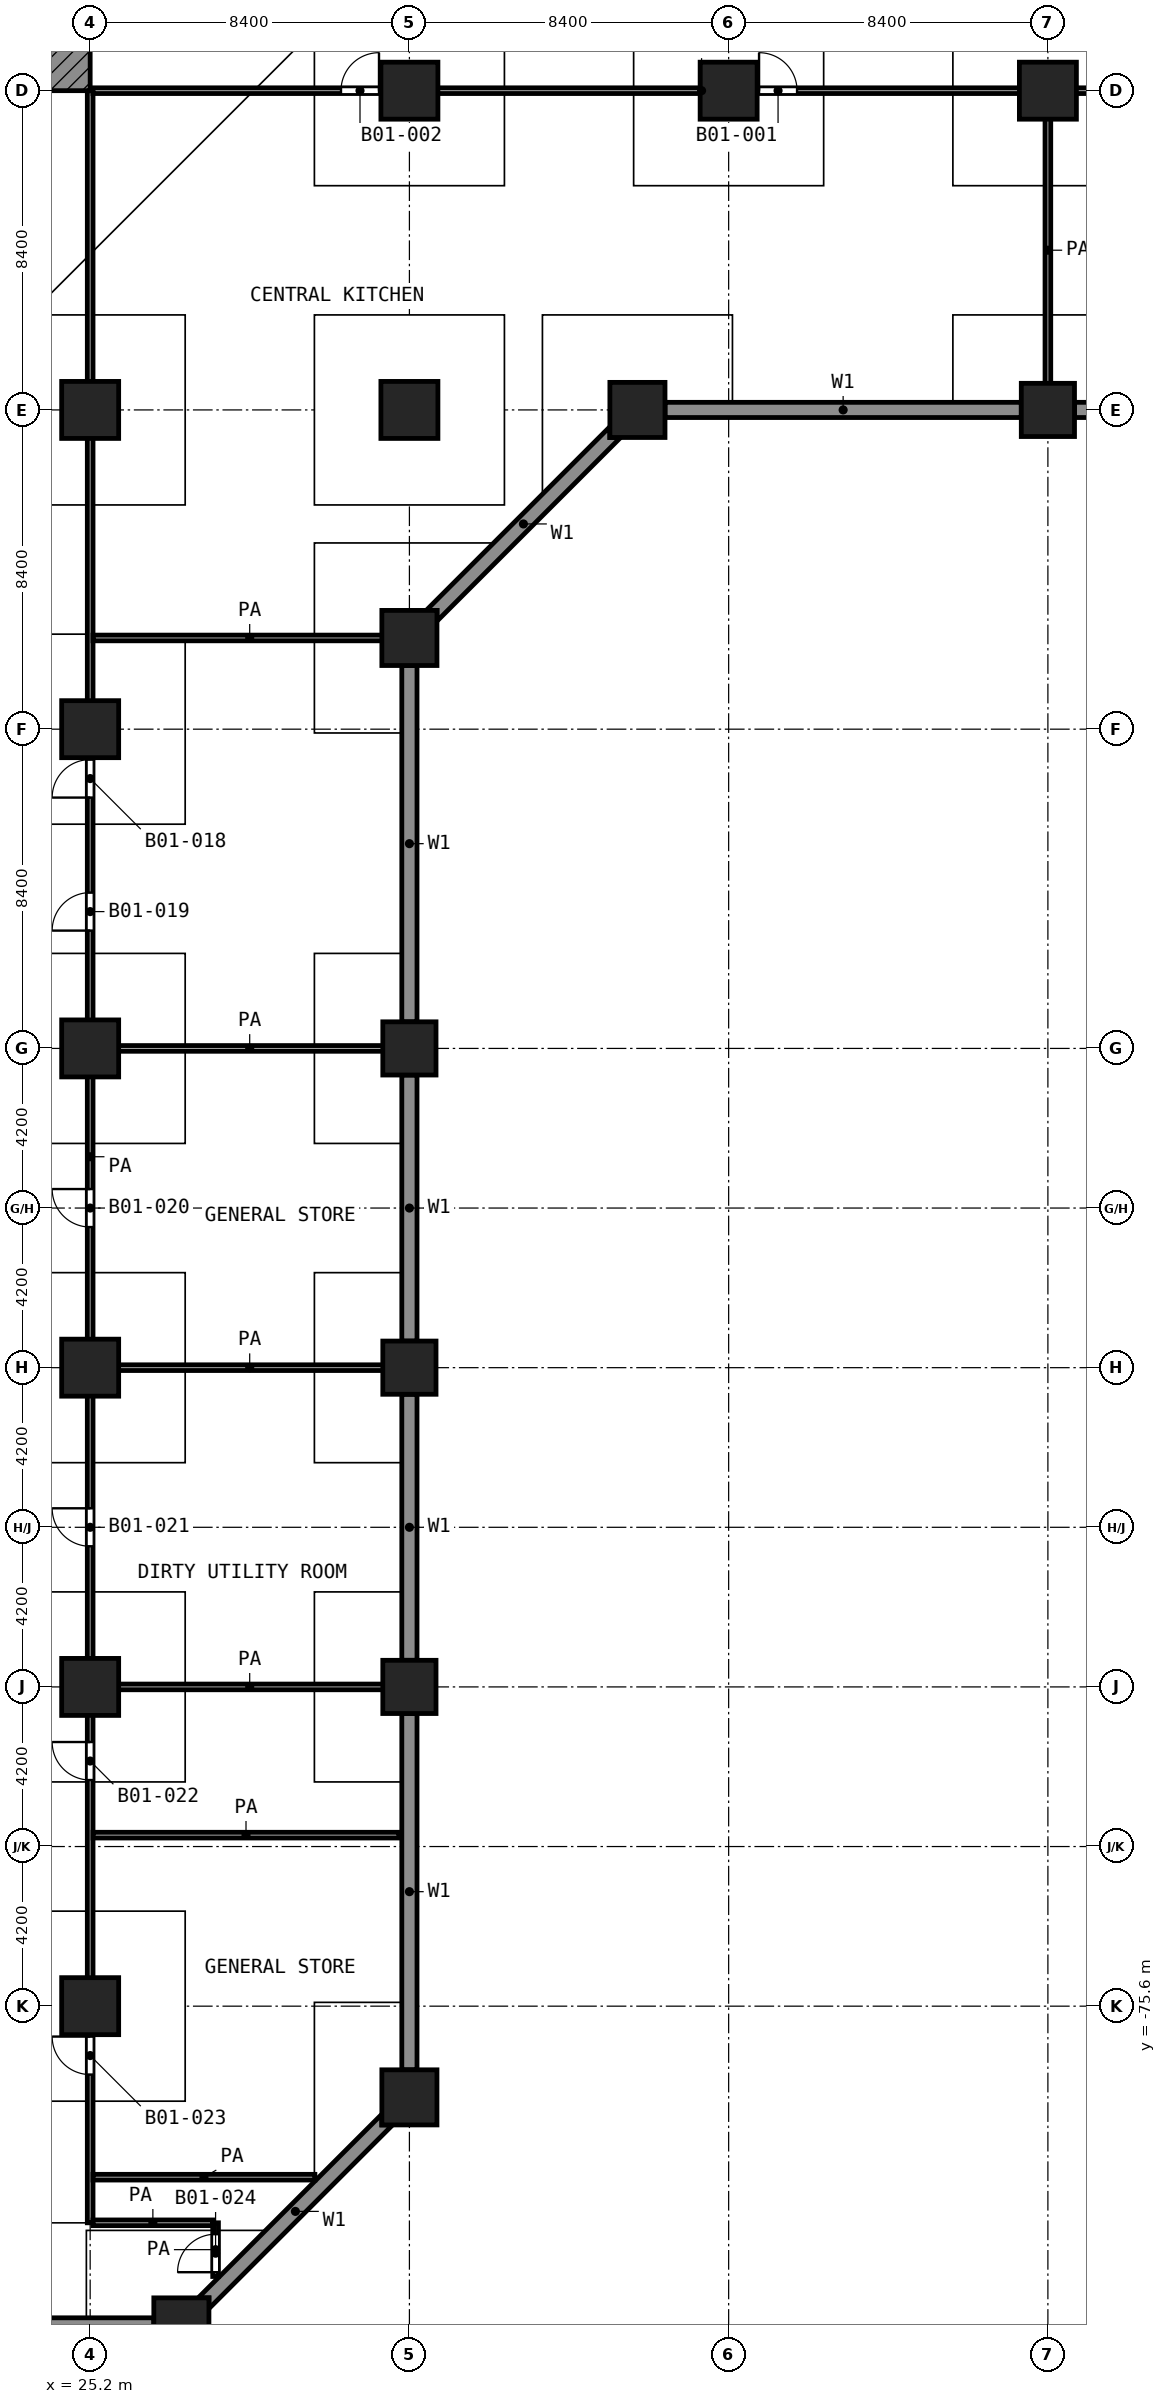
"""IFC4 building model, lengths in metres.
Left out: names, types, materials, properties, quantities, classifications, styles, units other than length and angle.
Written with IfcOpenShell. Run it as: python <this file> out.ifc"""

import sys

from ifc_helpers import new_model, si_unit, direction, frame, frame_2d, origin, origin_2d, place, context, subcontext, project, spatial, polyline, rectangle, outline, extrude, element, fill, save


model = new_model("IFC4")
c1 = context("Model", 3, precision=1e-05, world=origin(), true_north=direction((0.0, 1.0)))
c2 = subcontext(c1, "Body", "Model", "MODEL_VIEW")
j1 = project(units=[si_unit("LENGTHUNIT", "METRE"), si_unit("PLANEANGLEUNIT", "RADIAN")], contexts=[c1])
p1 = place(None, origin())
s1 = spatial("IfcSite", under=j1, at=p1, CompositionType="ELEMENT")
p2 = place(p1, origin())
s2 = spatial("IfcBuilding", under=s1, at=p2, CompositionType="ELEMENT")
p3 = place(p2, frame((0.0, 0.0, -6.0)))
s3 = spatial("IfcBuildingStorey", under=s2, at=p3, CompositionType="ELEMENT", Elevation=-6.0)
p4 = place(p3, origin())
e1 = element("IfcWall", 1, at=p4, inside=s3, PredefinedType="SOLIDWALL", context=c2, shape_type="SweptSolid", body=[
    extrude(outline(polyline([(40.325, -33.4), (49.7, -33.4), (49.7, -33.8), (40.325, -33.8), (40.325, -33.4)])), origin(), (0.0, 0.0, 1.0), 5.55),
])
e2 = element("IfcWall", 2, at=p4, inside=s3, PredefinedType="SOLIDWALL", context=c2, shape_type="SweptSolid", body=[
    extrude(outline(polyline([(51.1, -33.4), (57.6, -33.4), (57.6, -33.8), (51.1, -33.8), (51.1, -33.4)])), origin(), (0.0, 0.0, 1.0), 5.55),
])
e3 = element("IfcWall", 3, at=p4, inside=s3, PredefinedType="SOLIDWALL", context=c2, shape_type="SweptSolid", body=[
    extrude(outline(polyline([(34.325, -38.875), (34.042, -38.875), (38.875, -34.042), (38.875, -34.325), (39.158, -34.325), (34.325, -39.158), (34.325, -38.875)])), origin(), (0.0, 0.0, 1.0), 5.55),
])
e4 = element("IfcWall", 4, at=p4, inside=s3, PredefinedType="SOLIDWALL", context=c2, shape_type="SweptSolid", body=[
    extrude(outline(polyline([(33.4, -49.7), (33.4, -40.325), (33.8, -40.325), (33.8, -49.7), (33.4, -49.7)])), origin(), (0.0, 0.0, 1.0), 5.55),
])
e5 = element("IfcWall", 5, at=p4, inside=s3, PredefinedType="SOLIDWALL", context=c2, shape_type="SweptSolid", body=[
    extrude(outline(polyline([(33.4, -58.1), (33.4, -51.1), (33.8, -51.1), (33.8, -58.1), (33.4, -58.1)])), origin(), (0.0, 0.0, 1.0), 5.55),
])
e6 = element("IfcWall", 6, at=p4, inside=s3, PredefinedType="SOLIDWALL", context=c2, shape_type="SweptSolid", body=[
    extrude(outline(polyline([(33.4, -66.5), (33.4, -59.5), (33.8, -59.5), (33.8, -66.5), (33.4, -66.5)])), origin(), (0.0, 0.0, 1.0), 5.55),
])
e7 = element("IfcWall", 7, at=p4, inside=s3, PredefinedType="SOLIDWALL", context=c2, shape_type="SweptSolid", body=[
    extrude(outline(polyline([(33.4, -77.275), (33.4, -67.9), (33.8, -67.9), (33.8, -77.275), (33.4, -77.275)])), origin(), (0.0, 0.0, 1.0), 5.55),
])
e8 = element("IfcWall", 8, at=p4, inside=s3, PredefinedType="SOLIDWALL", context=c2, shape_type="SweptSolid", body=[
    extrude(outline(polyline([(28.325, -83.275), (28.042, -83.275), (32.875, -78.442), (32.875, -78.725), (33.158, -78.725), (28.325, -83.558), (28.325, -83.275)])), origin(), (0.0, 0.0, 1.0), 5.55),
])
e9 = element("IfcWall", 9, at=p4, inside=s3, PredefinedType="SOLIDWALL", context=c2, shape_type="SweptSolid", body=[
    extrude(outline(polyline([(17.5, -83.8), (26.875, -83.8), (26.875, -84.2), (17.5, -84.2), (17.5, -83.8)])), origin(), (0.0, 0.0, 1.0), 5.55),
])
for number, where, z_axis, x_axis in (
    (10, (33.6, -25.2, 0.0), (0.0, 0.0, 1.0), (1.0, 0.0, 0.0)),
    (11, (42.0, -25.2, 0.0), (0.0, 0.0, 1.0), (1.0, 0.0, 0.0)),
    (12, (50.4, -25.2, 0.0), (0.0, 0.0, 1.0), (1.0, 0.0, 0.0)),
    (13, (25.2, -33.6, 0.0), (0.0, 0.0, 1.0), (1.0, 0.0, 0.0)),
    (14, (33.6, -33.6, 0.0), (0.0, 0.0, 1.0), (1.0, 0.0, 0.0)),
):
    element("IfcColumn", number, at=place(p3, frame(where, z_axis=z_axis, x_axis=x_axis)), inside=s3, PredefinedType="COLUMN", context=c2, shape_type="SweptSolid", body=[
        extrude(rectangle(XDim=1.5, YDim=1.5, at=origin_2d()), origin(), (0.0, 0.0, 1.0), 6.0),
    ])
p5 = place(p3, frame((39.6, -33.6, 0.0), z_axis=(0.0, 0.0, 1.0), x_axis=(1.0, 0.0, 0.0)))
e15 = element("IfcColumn", 15, at=p5, inside=s3, PredefinedType="COLUMN", context=c2, shape_type="SweptSolid", body=[
    extrude(rectangle(XDim=1.45, YDim=1.45, at=origin_2d()), origin(), (0.0, 0.0, 1.0), 6.0),
])
p6 = place(p3, frame((50.4, -33.6, 0.0), z_axis=(0.0, 0.0, 1.0), x_axis=(1.0, 0.0, 0.0)))
e16 = element("IfcColumn", 16, at=p6, inside=s3, PredefinedType="COLUMN", context=c2, shape_type="SweptSolid", body=[
    extrude(rectangle(XDim=1.4, YDim=1.4, at=origin_2d()), origin(), (0.0, 0.0, 1.0), 6.0),
])
p7 = place(p3, frame((33.6, -39.6, 0.0), z_axis=(0.0, 0.0, 1.0), x_axis=(1.0, 0.0, 0.0)))
e17 = element("IfcColumn", 17, at=p7, inside=s3, PredefinedType="COLUMN", context=c2, shape_type="SweptSolid", body=[
    extrude(rectangle(XDim=1.45, YDim=1.45, at=origin_2d()), origin(), (0.0, 0.0, 1.0), 6.0),
])
for number, where, z_axis, x_axis in (
    (18, (25.2, -42.0, 0.0), (0.0, 0.0, 1.0), (1.0, 0.0, 0.0)),
    (19, (25.2, -50.4, 0.0), (0.0, 0.0, 1.0), (1.0, 0.0, 0.0)),
):
    element("IfcColumn", number, at=place(p3, frame(where, z_axis=z_axis, x_axis=x_axis)), inside=s3, PredefinedType="COLUMN", context=c2, shape_type="SweptSolid", body=[
        extrude(rectangle(XDim=1.5, YDim=1.5, at=origin_2d()), origin(), (0.0, 0.0, 1.0), 6.0),
    ])
p8 = place(p3, frame((33.6, -50.4, 0.0), z_axis=(0.0, 0.0, 1.0), x_axis=(1.0, 0.0, 0.0)))
e20 = element("IfcColumn", 20, at=p8, inside=s3, PredefinedType="COLUMN", context=c2, shape_type="SweptSolid", body=[
    extrude(rectangle(XDim=1.4, YDim=1.4, at=origin_2d()), origin(), (0.0, 0.0, 1.0), 6.0),
])
p9 = place(p3, frame((25.2, -58.8, 0.0), z_axis=(0.0, 0.0, 1.0), x_axis=(1.0, 0.0, 0.0)))
e21 = element("IfcColumn", 21, at=p9, inside=s3, PredefinedType="COLUMN", context=c2, shape_type="SweptSolid", body=[
    extrude(rectangle(XDim=1.5, YDim=1.5, at=origin_2d()), origin(), (0.0, 0.0, 1.0), 6.0),
])
p10 = place(p3, frame((33.6, -58.8, 0.0), z_axis=(0.0, 0.0, 1.0), x_axis=(1.0, 0.0, 0.0)))
e22 = element("IfcColumn", 22, at=p10, inside=s3, PredefinedType="COLUMN", context=c2, shape_type="SweptSolid", body=[
    extrude(rectangle(XDim=1.4, YDim=1.4, at=origin_2d()), origin(), (0.0, 0.0, 1.0), 6.0),
])
p11 = place(p3, frame((25.2, -67.2, 0.0), z_axis=(0.0, 0.0, 1.0), x_axis=(1.0, 0.0, 0.0)))
e23 = element("IfcColumn", 23, at=p11, inside=s3, PredefinedType="COLUMN", context=c2, shape_type="SweptSolid", body=[
    extrude(rectangle(XDim=1.5, YDim=1.5, at=origin_2d()), origin(), (0.0, 0.0, 1.0), 6.0),
])
p12 = place(p3, frame((33.6, -67.2, 0.0), z_axis=(0.0, 0.0, 1.0), x_axis=(1.0, 0.0, 0.0)))
e24 = element("IfcColumn", 24, at=p12, inside=s3, PredefinedType="COLUMN", context=c2, shape_type="SweptSolid", body=[
    extrude(rectangle(XDim=1.4, YDim=1.4, at=origin_2d()), origin(), (0.0, 0.0, 1.0), 6.0),
])
p13 = place(p3, frame((25.2, -75.6, 0.0), z_axis=(0.0, 0.0, 1.0), x_axis=(1.0, 0.0, 0.0)))
e25 = element("IfcColumn", 25, at=p13, inside=s3, PredefinedType="COLUMN", context=c2, shape_type="SweptSolid", body=[
    extrude(rectangle(XDim=1.5, YDim=1.5, at=origin_2d()), origin(), (0.0, 0.0, 1.0), 6.0),
])
for number, where, z_axis, x_axis in (
    (26, (33.6, -78.0, 0.0), (0.0, 0.0, 1.0), (1.0, 0.0, 0.0)),
    (27, (27.6, -84.0, 0.0), (0.0, 0.0, 1.0), (1.0, 0.0, 0.0)),
):
    element("IfcColumn", number, at=place(p3, frame(where, z_axis=z_axis, x_axis=x_axis)), inside=s3, PredefinedType="COLUMN", context=c2, shape_type="SweptSolid", body=[
        extrude(rectangle(XDim=1.45, YDim=1.45, at=origin_2d()), origin(), (0.0, 0.0, 1.0), 6.0),
    ])
p14 = place(p3, frame((24.6, -25.2, 0.0), z_axis=(0.0, 0.0, 1.0), x_axis=(0.0, 1.0, 0.0)))
e28 = element("IfcWall", 28, at=p14, inside=s3, PredefinedType="SHEAR", context=c2, shape_type="SweptSolid", body=[
    extrude(rectangle(XDim=1.2, YDim=1.2, at=frame_2d((0.6, 0.0))), origin(), (0.0, 0.0, 1.0), 5.55),
])
p15 = place(p3, frame((25.275, -81.3, 0.0), z_axis=(0.0, 0.0, 1.0), x_axis=(1.0, 0.0, 0.0)))
e29 = element("IfcWall", 29, at=p15, inside=s3, PredefinedType="PARTITIONING", context=c2, shape_type="SweptSolid", body=[
    extrude(rectangle(XDim=3.15, YDim=0.15, at=frame_2d((1.575, 0.0))), origin(), (0.0, 0.0, 1.0), 5.55),
])
p16 = place(p3, frame((25.275, -80.1, 0.0), z_axis=(0.0, 0.0, 1.0), x_axis=(1.0, 0.0, 0.0)))
e30 = element("IfcWall", 30, at=p16, inside=s3, PredefinedType="PARTITIONING", context=c2, shape_type="SweptSolid", body=[
    extrude(rectangle(XDim=5.838, YDim=0.15, at=frame_2d((2.919, 0.0))), origin(), (0.0, 0.0, 1.0), 5.55),
])
p17 = place(p3, frame((25.275, -71.1, 0.0), z_axis=(0.0, 0.0, 1.0), x_axis=(1.0, 0.0, 0.0)))
e31 = element("IfcWall", 31, at=p17, inside=s3, PredefinedType="PARTITIONING", context=c2, shape_type="SweptSolid", body=[
    extrude(rectangle(XDim=8.051, YDim=0.15, at=frame_2d((4.025, 0.0))), origin(), (0.0, 0.0, 1.0), 5.55),
])
for number, where, z_axis, x_axis in (
    (32, (25.275, -67.2, 0.0), (0.0, 0.0, 1.0), (1.0, 0.0, 0.0)),
    (33, (25.275, -58.8, 0.0), (0.0, 0.0, 1.0), (1.0, 0.0, 0.0)),
    (34, (25.275, -50.4, 0.0), (0.0, 0.0, 1.0), (1.0, 0.0, 0.0)),
    (35, (25.275, -39.6, 0.0), (0.0, 0.0, 1.0), (1.0, 0.0, 0.0)),
):
    element("IfcWall", number, at=place(p3, frame(where, z_axis=z_axis, x_axis=x_axis)), inside=s3, PredefinedType="PARTITIONING", context=c2, shape_type="SweptSolid", body=[
        extrude(rectangle(XDim=8.245, YDim=0.15, at=frame_2d((4.123, 0.0))), origin(), (0.0, 0.0, 1.0), 5.55),
    ])
p18 = place(p3, frame((25.275, -25.2, 0.0), z_axis=(0.0, 0.0, 1.0), x_axis=(1.0, 0.0, 0.0)))
e36 = element("IfcWall", 36, at=p18, inside=s3, PredefinedType="PARTITIONING", context=c2, shape_type="SweptSolid", body=[
    extrude(rectangle(XDim=32.025, YDim=0.15, at=frame_2d((16.013, 0.0))), origin(), (0.0, 0.0, 1.0), 5.55),
])
p19 = place(p18, frame((17.525, 0.0, 0.0)))
e37 = element("IfcOpeningElement", 37, at=p19, cuts=e36, PredefinedType="OPENING", context=c2, shape_type="SweptSolid", body=[
    extrude(rectangle(XDim=1.0, YDim=2.1, at=frame_2d((0.5, 1.05))), frame((0.0, 0.085, 0.0), z_axis=(0.0, -1.0, 0.0), x_axis=(1.0, 0.0, 0.0)), (0.0, 0.0, 1.0), 0.17),
])
p20 = place(p18, frame((6.525, 0.0, 0.0)))
e38 = element("IfcOpeningElement", 38, at=p20, cuts=e36, PredefinedType="OPENING", context=c2, shape_type="SweptSolid", body=[
    extrude(rectangle(XDim=1.0, YDim=2.1, at=frame_2d((0.5, 1.05))), frame((0.0, 0.085, 0.0), z_axis=(0.0, -1.0, 0.0), x_axis=(1.0, 0.0, 0.0)), (0.0, 0.0, 1.0), 0.17),
])
p21 = place(p18, frame((29.225, 0.0, 0.0)))
e39 = element("IfcOpeningElement", 39, at=p21, cuts=e36, PredefinedType="OPENING", context=c2, shape_type="SweptSolid", body=[
    extrude(rectangle(XDim=1.0, YDim=2.1, at=frame_2d((0.5, 1.05))), frame((0.0, 0.085, 0.0), z_axis=(0.0, -1.0, 0.0), x_axis=(1.0, 0.0, 0.0)), (0.0, 0.0, 1.0), 0.17),
])
p22 = place(p18, frame((26.925, 0.0, 0.0)))
e40 = element("IfcOpeningElement", 40, at=p22, cuts=e36, PredefinedType="OPENING", context=c2, shape_type="SweptSolid", body=[
    extrude(rectangle(XDim=1.0, YDim=2.1, at=frame_2d((0.5, 1.05))), frame((0.0, 0.085, 0.0), z_axis=(0.0, -1.0, 0.0), x_axis=(1.0, 0.0, 0.0)), (0.0, 0.0, 1.0), 0.17),
])
p23 = place(p3, frame((25.2, -81.3, 0.0), z_axis=(0.0, 0.0, 1.0), x_axis=(0.0, 1.0, 0.0)))
e41 = element("IfcWall", 41, at=p23, inside=s3, PredefinedType="PARTITIONING", context=c2, shape_type="SweptSolid", body=[
    extrude(rectangle(XDim=56.1, YDim=0.15, at=frame_2d((28.05, 0.0))), origin(), (0.0, 0.0, 1.0), 5.55),
])
p24 = place(p23, frame((37.5, 0.0, 0.0)))
e42 = element("IfcOpeningElement", 42, at=p24, cuts=e41, PredefinedType="OPENING", context=c2, shape_type="SweptSolid", body=[
    extrude(rectangle(XDim=1.0, YDim=2.1, at=frame_2d((0.5, 1.05))), frame((0.0, 0.085, 0.0), z_axis=(0.0, -1.0, 0.0), x_axis=(1.0, 0.0, 0.0)), (0.0, 0.0, 1.0), 0.17),
])
p25 = place(p23, frame((34.0, 0.0, 0.0)))
e43 = element("IfcOpeningElement", 43, at=p25, cuts=e41, PredefinedType="OPENING", context=c2, shape_type="SweptSolid", body=[
    extrude(rectangle(XDim=1.0, YDim=2.1, at=frame_2d((0.5, 1.05))), frame((0.0, 0.085, 0.0), z_axis=(0.0, -1.0, 0.0), x_axis=(1.0, 0.0, 0.0)), (0.0, 0.0, 1.0), 0.17),
])
p26 = place(p23, frame((26.2, 0.0, 0.0)))
e44 = element("IfcOpeningElement", 44, at=p26, cuts=e41, PredefinedType="OPENING", context=c2, shape_type="SweptSolid", body=[
    extrude(rectangle(XDim=1.0, YDim=2.1, at=frame_2d((0.5, 1.05))), frame((0.0, 0.085, 0.0), z_axis=(0.0, -1.0, 0.0), x_axis=(1.0, 0.0, 0.0)), (0.0, 0.0, 1.0), 0.17),
])
p27 = place(p23, frame((17.8, 0.0, 0.0)))
e45 = element("IfcOpeningElement", 45, at=p27, cuts=e41, PredefinedType="OPENING", context=c2, shape_type="SweptSolid", body=[
    extrude(rectangle(XDim=1.0, YDim=2.1, at=frame_2d((0.5, 1.05))), frame((0.0, 0.085, 0.0), z_axis=(0.0, -1.0, 0.0), x_axis=(1.0, 0.0, 0.0)), (0.0, 0.0, 1.0), 0.17),
])
p28 = place(p23, frame((11.65, 0.0, 0.0)))
e46 = element("IfcOpeningElement", 46, at=p28, cuts=e41, PredefinedType="OPENING", context=c2, shape_type="SweptSolid", body=[
    extrude(rectangle(XDim=1.0, YDim=2.1, at=frame_2d((0.5, 1.05))), frame((0.0, 0.085, 0.0), z_axis=(0.0, -1.0, 0.0), x_axis=(1.0, 0.0, 0.0)), (0.0, 0.0, 1.0), 0.17),
])
p29 = place(p23, frame((3.9, 0.0, 0.0)))
e47 = element("IfcOpeningElement", 47, at=p29, cuts=e41, PredefinedType="OPENING", context=c2, shape_type="SweptSolid", body=[
    extrude(rectangle(XDim=1.0, YDim=2.1, at=frame_2d((0.5, 1.05))), frame((0.0, 0.085, 0.0), z_axis=(0.0, -1.0, 0.0), x_axis=(1.0, 0.0, 0.0)), (0.0, 0.0, 1.0), 0.17),
])
p30 = place(p3, frame((28.5, -82.713, 0.0), z_axis=(0.0, 0.0, 1.0), x_axis=(0.0, 1.0, 0.0)))
e48 = element("IfcWall", 48, at=p30, inside=s3, PredefinedType="PARTITIONING", context=c2, shape_type="SweptSolid", body=[
    extrude(rectangle(XDim=1.413, YDim=0.15, at=frame_2d((0.707, 0.0))), origin(), (0.0, 0.0, 1.0), 5.55),
])
p31 = place(p30, frame((0.113, 0.0, 0.0)))
e49 = element("IfcOpeningElement", 49, at=p31, cuts=e48, PredefinedType="OPENING", context=c2, shape_type="SweptSolid", body=[
    extrude(rectangle(XDim=1.0, YDim=2.1, at=frame_2d((0.5, 1.05))), frame((0.0, 0.085, 0.0), z_axis=(0.0, -1.0, 0.0), x_axis=(1.0, 0.0, 0.0)), (0.0, 0.0, 1.0), 0.17),
])
p32 = place(p3, frame((50.4, -33.52, 0.0), z_axis=(0.0, 0.0, 1.0), x_axis=(0.0, 1.0, 0.0)))
e50 = element("IfcWall", 50, at=p32, inside=s3, PredefinedType="PARTITIONING", context=c2, shape_type="SweptSolid", body=[
    extrude(rectangle(XDim=8.245, YDim=0.15, at=frame_2d((4.123, 0.0))), origin(), (0.0, 0.0, 1.0), 5.55),
])
p33 = place(p19, origin())
e51 = element("IfcDoor", 51, at=p33, inside=s3, OperationType="SINGLE_SWING_LEFT", PredefinedType="DOOR", context=c2, shape_type="SweptSolid", body=[
    extrude(rectangle(XDim=1.0, YDim=2.1, at=frame_2d((0.5, 1.05))), frame((0.0, 0.025, 0.0), z_axis=(0.0, -1.0, 0.0), x_axis=(1.0, 0.0, 0.0)), (0.0, 0.0, 1.0), 0.05),
])
fill(e37, e51)
p34 = place(p20, origin())
e52 = element("IfcDoor", 52, at=p34, inside=s3, OperationType="SINGLE_SWING_RIGHT", PredefinedType="DOOR", context=c2, shape_type="SweptSolid", body=[
    extrude(rectangle(XDim=1.0, YDim=2.1, at=frame_2d((0.5, 1.05))), frame((0.0, 0.025, 0.0), z_axis=(0.0, -1.0, 0.0), x_axis=(1.0, 0.0, 0.0)), (0.0, 0.0, 1.0), 0.05),
])
fill(e38, e52)
p35 = place(p24, origin())
e53 = element("IfcDoor", 53, at=p35, inside=s3, OperationType="SINGLE_SWING_LEFT", PredefinedType="DOOR", context=c2, shape_type="SweptSolid", body=[
    extrude(rectangle(XDim=1.0, YDim=2.1, at=frame_2d((0.5, 1.05))), frame((0.0, 0.025, 0.0), z_axis=(0.0, -1.0, 0.0), x_axis=(1.0, 0.0, 0.0)), (0.0, 0.0, 1.0), 0.05),
])
fill(e42, e53)
p36 = place(p25, origin())
e54 = element("IfcDoor", 54, at=p36, inside=s3, OperationType="SINGLE_SWING_LEFT", PredefinedType="DOOR", context=c2, shape_type="SweptSolid", body=[
    extrude(rectangle(XDim=1.0, YDim=2.1, at=frame_2d((0.5, 1.05))), frame((0.0, 0.025, 0.0), z_axis=(0.0, -1.0, 0.0), x_axis=(1.0, 0.0, 0.0)), (0.0, 0.0, 1.0), 0.05),
])
fill(e43, e54)
p37 = place(p26, origin())
e55 = element("IfcDoor", 55, at=p37, inside=s3, OperationType="SINGLE_SWING_RIGHT", PredefinedType="DOOR", context=c2, shape_type="SweptSolid", body=[
    extrude(rectangle(XDim=1.0, YDim=2.1, at=frame_2d((0.5, 1.05))), frame((0.0, 0.025, 0.0), z_axis=(0.0, -1.0, 0.0), x_axis=(1.0, 0.0, 0.0)), (0.0, 0.0, 1.0), 0.05),
])
fill(e44, e55)
p38 = place(p27, origin())
e56 = element("IfcDoor", 56, at=p38, inside=s3, OperationType="SINGLE_SWING_RIGHT", PredefinedType="DOOR", context=c2, shape_type="SweptSolid", body=[
    extrude(rectangle(XDim=1.0, YDim=2.1, at=frame_2d((0.5, 1.05))), frame((0.0, 0.025, 0.0), z_axis=(0.0, -1.0, 0.0), x_axis=(1.0, 0.0, 0.0)), (0.0, 0.0, 1.0), 0.05),
])
fill(e45, e56)
p39 = place(p28, origin())
e57 = element("IfcDoor", 57, at=p39, inside=s3, OperationType="SINGLE_SWING_RIGHT", PredefinedType="DOOR", context=c2, shape_type="SweptSolid", body=[
    extrude(rectangle(XDim=1.0, YDim=2.1, at=frame_2d((0.5, 1.05))), frame((0.0, 0.025, 0.0), z_axis=(0.0, -1.0, 0.0), x_axis=(1.0, 0.0, 0.0)), (0.0, 0.0, 1.0), 0.05),
])
fill(e46, e57)
p40 = place(p29, origin())
e58 = element("IfcDoor", 58, at=p40, inside=s3, OperationType="SINGLE_SWING_RIGHT", PredefinedType="DOOR", context=c2, shape_type="SweptSolid", body=[
    extrude(rectangle(XDim=1.0, YDim=2.1, at=frame_2d((0.5, 1.05))), frame((0.0, 0.025, 0.0), z_axis=(0.0, -1.0, 0.0), x_axis=(1.0, 0.0, 0.0)), (0.0, 0.0, 1.0), 0.05),
])
fill(e47, e58)
p41 = place(p31, origin())
e59 = element("IfcDoor", 59, at=p41, inside=s3, OperationType="SINGLE_SWING_LEFT", PredefinedType="DOOR", context=c2, shape_type="SweptSolid", body=[
    extrude(rectangle(XDim=1.0, YDim=2.1, at=frame_2d((0.5, 1.05))), frame((0.0, 0.025, 0.0), z_axis=(0.0, -1.0, 0.0), x_axis=(1.0, 0.0, 0.0)), (0.0, 0.0, 1.0), 0.05),
])
fill(e49, e59)
save(model, sys.argv[1])
